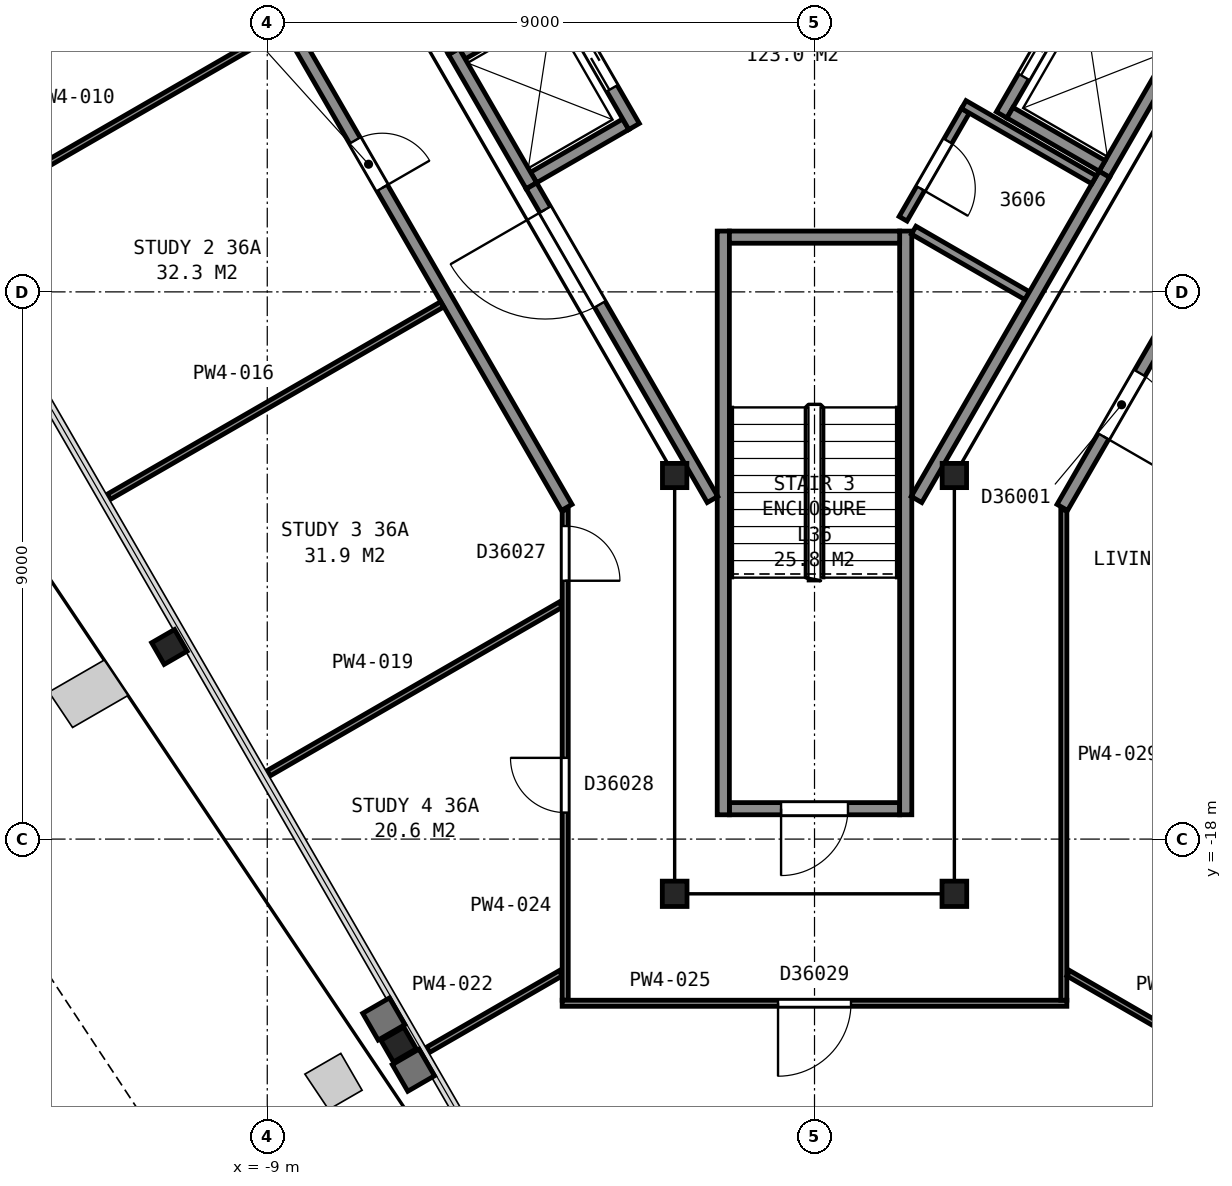
"""IFC4 building model, lengths in metres.
Left out: names, types, materials, properties, quantities, classifications, styles, units other than length and angle.
Written with IfcOpenShell. Run it as: python <this file> out.ifc"""

import sys

from ifc_helpers import new_model, si_unit, direction, frame, frame_2d, origin, origin_2d, place, context, subcontext, project, spatial, rectangle, i_section, extrude, element, fill, save


model = new_model("IFC4")
c1 = context("Model", 3, precision=1e-05, world=origin(), true_north=direction((0.0, 1.0)))
c2 = subcontext(c1, "Body", "Model", "MODEL_VIEW")
j1 = project(units=[si_unit("LENGTHUNIT", "METRE"), si_unit("PLANEANGLEUNIT", "RADIAN")], contexts=[c1])
p1 = place(None, origin())
s1 = spatial("IfcSite", under=j1, at=p1, CompositionType="ELEMENT")
p2 = place(p1, origin())
s2 = spatial("IfcBuilding", under=s1, at=p2, CompositionType="ELEMENT")
p3 = place(p2, frame((0.0, 0.0, 148.8)))
s3 = spatial("IfcBuildingStorey", under=s2, at=p3, CompositionType="ELEMENT", Elevation=148.8)
for number, where, z_axis, x_axis in (
    (1, (-10.61, -14.84, 0.0), (0.0, 0.0, 1.0), (-0.5, 0.866, 0.0)),
    (2, (-6.84, -21.38, 0.0), (0.0, 0.0, 1.0), (-0.5, 0.866, 0.0)),
):
    element("IfcColumn", number, at=place(p3, frame(where, z_axis=z_axis, x_axis=x_axis)), inside=s3, PredefinedType="COLUMN", context=c2, shape_type="SweptSolid", body=[
        extrude(i_section(OverallWidth=0.411, OverallDepth=0.434, WebThickness=0.036, FlangeThickness=0.057, FilletRadius=0.015, at=origin_2d()), origin(), (0.0, 0.0, 1.0), 3.7),
    ])
p4 = place(p3, frame((-2.3, -12.02, 0.05), z_axis=(0.0, 0.0, 1.0), x_axis=(1.0, 0.0, 0.0)))
e3 = element("IfcColumn", 3, at=p4, inside=s3, PredefinedType="COLUMN", context=c2, shape_type="SweptSolid", body=[
    extrude(i_section(OverallWidth=0.401, OverallDepth=0.399, WebThickness=0.025, FlangeThickness=0.04, FilletRadius=0.015, at=origin_2d()), origin(), (0.0, 0.0, 1.0), 3.65),
])
for number, where, z_axis, x_axis in (
    (4, (-2.3, -18.9, 0.055), (0.0, 0.0, 1.0), (-1.0, 0.0, 0.0)),
    (5, (2.3, -18.9, 0.055), (0.0, 0.0, 1.0), (-1.0, 0.0, 0.0)),
):
    element("IfcColumn", number, at=place(p3, frame(where, z_axis=z_axis, x_axis=x_axis)), inside=s3, PredefinedType="COLUMN", context=c2, shape_type="SweptSolid", body=[
        extrude(i_section(OverallWidth=0.406, OverallDepth=0.417, WebThickness=0.03, FlangeThickness=0.048, FilletRadius=0.015, at=origin_2d()), origin(), (0.0, 0.0, 1.0), 3.645),
    ])
p5 = place(p3, frame((2.3, -12.02, 0.05), z_axis=(0.0, 0.0, 1.0), x_axis=(1.0, 0.0, 0.0)))
e6 = element("IfcColumn", 6, at=p5, inside=s3, PredefinedType="COLUMN", context=c2, shape_type="SweptSolid", body=[
    extrude(i_section(OverallWidth=0.401, OverallDepth=0.399, WebThickness=0.025, FlangeThickness=0.04, FilletRadius=0.015, at=origin_2d()), origin(), (0.0, 0.0, 1.0), 3.65),
])
p6 = place(p3, frame((-1.4, -17.5, 0.0), z_axis=(0.0, 0.0, 1.0), x_axis=(1.0, 0.0, 0.0)))
e7 = element("IfcWall", 7, at=p6, inside=s3, PredefinedType="PARTITIONING", context=c2, shape_type="SweptSolid", body=[
    extrude(rectangle(XDim=2.8, YDim=0.2, at=frame_2d((1.4, 0.0))), origin(), (0.0, 0.0, 1.0), 3.45),
])
p7 = place(p6, frame((0.85, 0.0, 0.0)))
e8 = element("IfcOpeningElement", 8, at=p7, cuts=e7, PredefinedType="OPENING", context=c2, shape_type="SweptSolid", body=[
    extrude(rectangle(XDim=1.1, YDim=2.1, at=frame_2d((0.55, 1.05))), frame((0.0, 0.11, 0.0), z_axis=(0.0, -1.0, 0.0), x_axis=(1.0, 0.0, 0.0)), (0.0, 0.0, 1.0), 0.22),
])
for number, where, z_axis, x_axis in (
    (9, (1.5, -8.0, 0.0), (0.0, 0.0, 1.0), (0.0, -1.0, 0.0)),
    (10, (-1.5, -8.0, 0.0), (0.0, 0.0, 1.0), (0.0, -1.0, 0.0)),
):
    element("IfcWall", number, at=place(p3, frame(where, z_axis=z_axis, x_axis=x_axis)), inside=s3, PredefinedType="PARTITIONING", context=c2, shape_type="SweptSolid", body=[
        extrude(rectangle(XDim=9.6, YDim=0.2, at=frame_2d((4.8, 0.0))), origin(), (0.0, 0.0, 1.0), 3.45),
    ])
p8 = place(p3, frame((-1.4, -8.1, 0.0), z_axis=(0.0, 0.0, 1.0), x_axis=(1.0, 0.0, 0.0)))
e11 = element("IfcWall", 11, at=p8, inside=s3, PredefinedType="PARTITIONING", context=c2, shape_type="SweptSolid", body=[
    extrude(rectangle(XDim=2.8, YDim=0.2, at=frame_2d((1.4, 0.0))), origin(), (0.0, 0.0, 1.0), 3.45),
])
for number, where, z_axis, x_axis in (
    (12, (-4.62, -7.118, 0.0), (0.0, 0.0, 1.0), (0.866, 0.5, 0.0)),
    (13, (-5.795, -5.083, 0.0), (0.0, 0.0, 1.0), (0.866, 0.5, 0.0)),
):
    element("IfcWall", number, at=place(p3, frame(where, z_axis=z_axis, x_axis=x_axis)), inside=s3, PredefinedType="PARTITIONING", context=c2, shape_type="SweptSolid", body=[
        extrude(rectangle(XDim=1.75, YDim=0.2, at=frame_2d((0.875, 0.0))), origin(), (0.0, 0.0, 1.0), 3.7),
    ])
p9 = place(p3, frame((4.766, -7.065, 0.0), z_axis=(0.0, 0.0, 1.0), x_axis=(0.499948979701, 0.866054858364, 0.0)))
e14 = element("IfcWall", 14, at=p9, inside=s3, PredefinedType="PARTITIONING", context=c2, shape_type="SweptSolid", body=[
    extrude(rectangle(XDim=2.55, YDim=0.2, at=frame_2d((1.275, 0.0))), origin(), (0.0, 0.0, 1.0), 3.7),
])
p10 = place(p3, frame((3.077, -6.09, 0.0), z_axis=(0.0, 0.0, 1.0), x_axis=(0.500062241894, 0.865989465428, 0.0)))
e15 = element("IfcWall", 15, at=p10, inside=s3, PredefinedType="PARTITIONING", context=c2, shape_type="SweptSolid", body=[
    extrude(rectangle(XDim=2.55, YDim=0.2, at=frame_2d((1.275, 0.0))), origin(), (0.0, 0.0, 1.0), 3.7),
])
p11 = place(p10, frame((0.725, 0.0, 0.0)))
e16 = element("IfcOpeningElement", 16, at=p11, cuts=e15, PredefinedType="OPENING", context=c2, shape_type="SweptSolid", body=[
    extrude(rectangle(XDim=1.1, YDim=2.1, at=frame_2d((0.55, 1.05))), frame((0.0, 0.11, 0.0), z_axis=(0.0, -1.0, 0.0), x_axis=(1.0, 0.0, 0.0)), (0.0, 0.0, 1.0), 0.22),
])
p12 = place(p3, frame((-2.968, -6.28, 0.0), z_axis=(0.0, 0.0, 1.0), x_axis=(-0.499990435942, 0.866030925526, 0.0)))
e17 = element("IfcWall", 17, at=p12, inside=s3, PredefinedType="PARTITIONING", context=c2, shape_type="SweptSolid", body=[
    extrude(rectangle(XDim=2.55, YDim=0.2, at=frame_2d((1.275, 0.0))), origin(), (0.0, 0.0, 1.0), 3.7),
])
p13 = place(p12, frame((0.725, 0.0, 0.0)))
e18 = element("IfcOpeningElement", 18, at=p13, cuts=e17, PredefinedType="OPENING", context=c2, shape_type="SweptSolid", body=[
    extrude(rectangle(XDim=1.1, YDim=2.1, at=frame_2d((0.55, 1.05))), frame((0.0, 0.11, 0.0), z_axis=(0.0, -1.0, 0.0), x_axis=(1.0, 0.0, 0.0)), (0.0, 0.0, 1.0), 0.22),
])
p14 = place(p3, frame((-4.656, -7.255, 0.0), z_axis=(0.0, 0.0, 1.0), x_axis=(-0.499990435942, 0.866030925526, 0.0)))
e19 = element("IfcWall", 19, at=p14, inside=s3, PredefinedType="PARTITIONING", context=c2, shape_type="SweptSolid", body=[
    extrude(rectangle(XDim=2.55, YDim=0.2, at=frame_2d((1.275, 0.0))), origin(), (0.0, 0.0, 1.0), 3.7),
])
p15 = place(p3, frame((4.73, -6.928, 0.0), z_axis=(0.0, 0.0, 1.0), x_axis=(-0.866036909293, 0.499980071345, 0.0)))
e20 = element("IfcWall", 20, at=p15, inside=s3, PredefinedType="PARTITIONING", context=c2, shape_type="SweptSolid", body=[
    extrude(rectangle(XDim=1.75, YDim=0.2, at=frame_2d((0.875, 0.0))), origin(), (0.0, 0.0, 1.0), 3.7),
])
p16 = place(p3, frame((-7.005, -3.187, 0.0), z_axis=(0.0, 0.0, 1.0), x_axis=(0.499689606989, -0.866204535123, 0.0)))
e21 = element("IfcWall", 21, at=p16, inside=s3, PredefinedType="PARTITIONING", context=c2, shape_type="SweptSolid", body=[
    extrude(rectangle(XDim=2.145, YDim=0.2, at=frame_2d((1.072, 0.0))), origin(), (0.0, 0.0, 1.0), 3.45),
])
p17 = place(p3, frame((-4.655, -7.257, 0.0), z_axis=(0.0, 0.0, 1.0), x_axis=(0.499966124405, -0.866044960985, 0.0)))
e22 = element("IfcWall", 22, at=p17, inside=s3, PredefinedType="PARTITIONING", context=c2, shape_type="SweptSolid", body=[
    extrude(rectangle(XDim=5.956, YDim=0.2, at=frame_2d((2.978, 0.0))), origin(), (0.0, 0.0, 1.0), 3.45),
])
p18 = place(p17, frame((0.45, 0.0, 0.0)))
e23 = element("IfcOpeningElement", 23, at=p18, cuts=e22, PredefinedType="OPENING", context=c2, shape_type="SweptSolid", body=[
    extrude(rectangle(XDim=1.8, YDim=2.1, at=frame_2d((0.9, 1.05))), frame((0.0, 0.11, 0.0), z_axis=(0.0, -1.0, 0.0), x_axis=(1.0, 0.0, 0.0)), (0.0, 0.0, 1.0), 0.22),
])
p19 = place(p3, frame((2.481, -6.022, 0.0), z_axis=(0.0, 0.0, 1.0), x_axis=(-0.499801470403, -0.866139994564, 0.0)))
e24 = element("IfcWall", 24, at=p19, inside=s3, PredefinedType="PARTITIONING", context=c2, shape_type="SweptSolid", body=[
    extrude(rectangle(XDim=2.051, YDim=0.15, at=frame_2d((1.025, 0.0))), origin(), (0.0, 0.0, 1.0), 3.45),
])
p20 = place(p19, frame((0.576, 0.0, 0.0)))
e25 = element("IfcOpeningElement", 25, at=p20, cuts=e24, PredefinedType="OPENING", context=c2, shape_type="SweptSolid", body=[
    extrude(rectangle(XDim=0.9, YDim=2.1, at=frame_2d((0.45, 1.05))), frame((0.0, 0.085, 0.0), z_axis=(0.0, -1.0, 0.0), x_axis=(1.0, 0.0, 0.0)), (0.0, 0.0, 1.0), 0.17),
])
p21 = place(p3, frame((1.631, -7.986, 0.0), z_axis=(0.0, 0.0, 1.0), x_axis=(0.866038426532, -0.499977443261, 0.0)))
e26 = element("IfcWall", 26, at=p21, inside=s3, PredefinedType="PARTITIONING", context=c2, shape_type="SweptSolid", body=[
    extrude(rectangle(XDim=2.155, YDim=0.15, at=frame_2d((1.077, 0.0))), origin(), (0.0, 0.0, 1.0), 3.45),
])
p22 = place(p3, frame((1.677, -12.415, 0.0), z_axis=(0.0, 0.0, 1.0), x_axis=(0.500054337157, 0.865994029939, 0.0)))
e27 = element("IfcWall", 27, at=p22, inside=s3, PredefinedType="PARTITIONING", context=c2, shape_type="SweptSolid", body=[
    extrude(rectangle(XDim=6.177, YDim=0.2, at=frame_2d((3.088, 0.0))), origin(), (0.0, 0.0, 1.0), 3.45),
])
p23 = place(p3, frame((2.454, -5.919, 0.0), z_axis=(0.0, 0.0, 1.0), x_axis=(0.866006523861, -0.500032699561, 0.0)))
e28 = element("IfcWall", 28, at=p23, inside=s3, PredefinedType="PARTITIONING", context=c2, shape_type="SweptSolid", body=[
    extrude(rectangle(XDim=2.475, YDim=0.15, at=frame_2d((1.237, 0.0))), origin(), (0.0, 0.0, 1.0), 3.45),
])
p24 = place(p3, frame((-14.23, -7.823, 0.0), z_axis=(0.0, 0.0, 1.0), x_axis=(0.866021249958, 0.50000719457, 0.0)))
e29 = element("IfcWall", 29, at=p24, inside=s3, PredefinedType="PARTITIONING", context=c2, shape_type="SweptSolid", body=[
    extrude(rectangle(XDim=6.333, YDim=0.1, at=frame_2d((3.167, 0.0))), origin(), (0.0, 0.0, 1.0), 2.713),
])
p25 = place(p3, frame((-4.075, -12.545, 0.0), z_axis=(0.0, 0.0, 1.0), x_axis=(-0.499999743747, 0.866025551732, 0.0)))
e30 = element("IfcWall", 30, at=p25, inside=s3, PredefinedType="PARTITIONING", context=c2, shape_type="SweptSolid", body=[
    extrude(rectangle(XDim=17.656, YDim=0.2, at=frame_2d((8.828, 0.0))), origin(), (0.0, 0.0, 1.0), 2.713),
])
p26 = place(p25, frame((10.08, 0.0, 0.0)))
e31 = element("IfcOpeningElement", 31, at=p26, cuts=e30, PredefinedType="OPENING", context=c2, shape_type="SweptSolid", body=[
    extrude(rectangle(XDim=0.9, YDim=2.1, at=frame_2d((0.45, 1.05))), frame((0.0, 0.11, 0.0), z_axis=(0.0, -1.0, 0.0), x_axis=(1.0, 0.0, 0.0)), (0.0, 0.0, 1.0), 0.22),
])
p27 = place(p25, frame((6.068, 0.0, 0.0)))
e32 = element("IfcOpeningElement", 32, at=p27, cuts=e30, PredefinedType="OPENING", context=c2, shape_type="SweptSolid", body=[
    extrude(rectangle(XDim=0.9, YDim=2.1, at=frame_2d((0.45, 1.05))), frame((0.0, 0.11, 0.0), z_axis=(0.0, -1.0, 0.0), x_axis=(1.0, 0.0, 0.0)), (0.0, 0.0, 1.0), 0.22),
])
p28 = place(p3, frame((-11.605, -12.37, 0.0), z_axis=(0.0, 0.0, 1.0), x_axis=(0.866017278078, 0.500014073873, 0.0)))
e33 = element("IfcWall", 33, at=p28, inside=s3, PredefinedType="PARTITIONING", context=c2, shape_type="SweptSolid", body=[
    extrude(rectangle(XDim=6.329, YDim=0.1, at=frame_2d((3.165, 0.0))), origin(), (0.0, 0.0, 1.0), 2.713),
])
p29 = place(p3, frame((-8.979, -16.918, 0.0), z_axis=(0.0, 0.0, 1.0), x_axis=(0.866046339293, 0.499963736882, 0.0)))
e34 = element("IfcWall", 34, at=p29, inside=s3, PredefinedType="PARTITIONING", context=c2, shape_type="SweptSolid", body=[
    extrude(rectangle(XDim=5.547, YDim=0.1, at=frame_2d((2.774, 0.0))), origin(), (0.0, 0.0, 1.0), 2.713),
])
p30 = place(p3, frame((-6.354, -21.465, 0.0), z_axis=(0.0, 0.0, 1.0), x_axis=(0.866061165757, 0.499938053331, 0.0)))
e35 = element("IfcWall", 35, at=p30, inside=s3, PredefinedType="PARTITIONING", context=c2, shape_type="SweptSolid", body=[
    extrude(rectangle(XDim=2.516, YDim=0.1, at=frame_2d((1.258, 0.0))), origin(), (0.0, 0.0, 1.0), 2.713),
])
p31 = place(p3, frame((-4.1, -20.65, 0.0), z_axis=(0.0, 0.0, 1.0), x_axis=(0.0, 1.0, 0.0)))
e36 = element("IfcWall", 36, at=p31, inside=s3, PredefinedType="PARTITIONING", context=c2, shape_type="SweptSolid", body=[
    extrude(rectangle(XDim=8.063, YDim=0.1, at=frame_2d((4.031, 0.0))), origin(), (0.0, 0.0, 1.0), 2.713),
])
p32 = place(p31, frame((6.899, 0.0, 0.0)))
e37 = element("IfcOpeningElement", 37, at=p32, cuts=e36, PredefinedType="OPENING", context=c2, shape_type="SweptSolid", body=[
    extrude(rectangle(XDim=0.9, YDim=2.1, at=frame_2d((0.45, 1.05))), frame((0.0, 0.06, 0.0), z_axis=(0.0, -1.0, 0.0), x_axis=(1.0, 0.0, 0.0)), (0.0, 0.0, 1.0), 0.12),
])
p33 = place(p31, frame((3.086, 0.0, 0.0)))
e38 = element("IfcOpeningElement", 38, at=p33, cuts=e36, PredefinedType="OPENING", context=c2, shape_type="SweptSolid", body=[
    extrude(rectangle(XDim=0.9, YDim=2.1, at=frame_2d((0.45, 1.05))), frame((0.0, 0.06, 0.0), z_axis=(0.0, -1.0, 0.0), x_axis=(1.0, 0.0, 0.0)), (0.0, 0.0, 1.0), 0.12),
])
p34 = place(p3, frame((4.15, -20.7, 0.0), z_axis=(0.0, 0.0, 1.0), x_axis=(-1.0, 0.0, 0.0)))
e39 = element("IfcWall", 39, at=p34, inside=s3, PredefinedType="PARTITIONING", context=c2, shape_type="SweptSolid", body=[
    extrude(rectangle(XDim=8.3, YDim=0.1, at=frame_2d((4.15, 0.0))), origin(), (0.0, 0.0, 1.0), 2.713),
])
p35 = place(p34, frame((3.55, 0.0, 0.0)))
e40 = element("IfcOpeningElement", 40, at=p35, cuts=e39, PredefinedType="OPENING", context=c2, shape_type="SweptSolid", body=[
    extrude(rectangle(XDim=1.2, YDim=2.1, at=frame_2d((0.6, 1.05))), frame((0.0, 0.06, 0.0), z_axis=(0.0, -1.0, 0.0), x_axis=(1.0, 0.0, 0.0)), (0.0, 0.0, 1.0), 0.12),
])
p36 = place(p3, frame((4.1, -20.65, 0.0), z_axis=(0.0, 0.0, 1.0), x_axis=(0.0, 1.0, 0.0)))
e41 = element("IfcWall", 41, at=p36, inside=s3, PredefinedType="PARTITIONING", context=c2, shape_type="SweptSolid", body=[
    extrude(rectangle(XDim=8.063, YDim=0.1, at=frame_2d((4.031, 0.0))), origin(), (0.0, 0.0, 1.0), 2.713),
])
p37 = place(p3, frame((4.175, -20.207, 0.0), z_axis=(0.0, 0.0, 1.0), x_axis=(0.866061165757, -0.499938053331, 0.0)))
e42 = element("IfcWall", 42, at=p37, inside=s3, PredefinedType="PARTITIONING", context=c2, shape_type="SweptSolid", body=[
    extrude(rectangle(XDim=2.516, YDim=0.1, at=frame_2d((1.258, 0.0))), origin(), (0.0, 0.0, 1.0), 2.713),
])
p38 = place(p3, frame((12.928, 2.789, 0.0), z_axis=(0.0, 0.0, 1.0), x_axis=(-0.499997769292, -0.86602669168, 0.0)))
e43 = element("IfcWall", 43, at=p38, inside=s3, PredefinedType="PARTITIONING", context=c2, shape_type="SweptSolid", body=[
    extrude(rectangle(XDim=17.706, YDim=0.2, at=frame_2d((8.853, 0.0))), origin(), (0.0, 0.0, 1.0), 2.713),
])
p39 = place(p38, frame((15.156, 0.0, 0.0)))
e44 = element("IfcOpeningElement", 44, at=p39, cuts=e43, PredefinedType="OPENING", context=c2, shape_type="SweptSolid", body=[
    extrude(rectangle(XDim=1.2, YDim=2.1, at=frame_2d((0.6, 1.05))), frame((0.0, 0.11, 0.0), z_axis=(0.0, -1.0, 0.0), x_axis=(1.0, 0.0, 0.0)), (0.0, 0.0, 1.0), 0.22),
])
p40 = place(p38, frame((11.042, 0.0, 0.0)))
e45 = element("IfcOpeningElement", 45, at=p40, cuts=e43, PredefinedType="OPENING", context=c2, shape_type="SweptSolid", body=[
    extrude(rectangle(XDim=0.9, YDim=2.1, at=frame_2d((0.45, 1.05))), frame((0.0, 0.11, 0.0), z_axis=(0.0, -1.0, 0.0), x_axis=(1.0, 0.0, 0.0)), (0.0, 0.0, 1.0), 0.22),
])
p41 = place(p38, frame((7.14, 0.0, 0.0)))
e46 = element("IfcOpeningElement", 46, at=p41, cuts=e43, PredefinedType="OPENING", context=c2, shape_type="SweptSolid", body=[
    extrude(rectangle(XDim=0.9, YDim=2.1, at=frame_2d((0.45, 1.05))), frame((0.0, 0.11, 0.0), z_axis=(0.0, -1.0, 0.0), x_axis=(1.0, 0.0, 0.0)), (0.0, 0.0, 1.0), 0.22),
])
p42 = place(p38, frame((0.515, 0.0, 0.0)))
e47 = element("IfcOpeningElement", 47, at=p42, cuts=e43, PredefinedType="OPENING", context=c2, shape_type="SweptSolid", body=[
    extrude(rectangle(XDim=0.9, YDim=2.1, at=frame_2d((0.45, 1.05))), frame((0.0, 0.11, 0.0), z_axis=(0.0, -1.0, 0.0), x_axis=(1.0, 0.0, 0.0)), (0.0, 0.0, 1.0), 0.22),
])
p43 = place(p7, origin())
e48 = element("IfcDoor", 48, at=p43, inside=s3, OperationType="SINGLE_SWING_LEFT", PredefinedType="DOOR", context=c2, shape_type="SweptSolid", body=[
    extrude(rectangle(XDim=1.1, YDim=2.1, at=frame_2d((0.55, 1.05))), frame((0.0, 0.025, 0.0), z_axis=(0.0, -1.0, 0.0), x_axis=(1.0, 0.0, 0.0)), (0.0, 0.0, 1.0), 0.05),
])
fill(e8, e48)
p44 = place(p11, origin())
e49 = element("IfcDoor", 49, at=p44, inside=s3, OperationType="SLIDING_TO_LEFT", PredefinedType="DOOR", context=c2, shape_type="SweptSolid", body=[
    extrude(rectangle(XDim=1.1, YDim=2.1, at=frame_2d((0.55, 1.05))), frame((0.0, 0.025, 0.0), z_axis=(0.0, -1.0, 0.0), x_axis=(1.0, 0.0, 0.0)), (0.0, 0.0, 1.0), 0.05),
])
fill(e16, e49)
p45 = place(p13, origin())
e50 = element("IfcDoor", 50, at=p45, inside=s3, OperationType="SLIDING_TO_RIGHT", PredefinedType="DOOR", context=c2, shape_type="SweptSolid", body=[
    extrude(rectangle(XDim=1.1, YDim=2.1, at=frame_2d((0.55, 1.05))), frame((0.0, 0.025, 0.0), z_axis=(0.0, -1.0, 0.0), x_axis=(1.0, 0.0, 0.0)), (0.0, 0.0, 1.0), 0.05),
])
fill(e18, e50)
p46 = place(p18, origin())
e51 = element("IfcDoor", 51, at=p46, inside=s3, OperationType="DOUBLE_DOOR_SINGLE_SWING", PredefinedType="DOOR", context=c2, shape_type="SweptSolid", body=[
    extrude(rectangle(XDim=1.8, YDim=2.1, at=frame_2d((0.9, 1.05))), frame((0.0, 0.025, 0.0), z_axis=(0.0, -1.0, 0.0), x_axis=(1.0, 0.0, 0.0)), (0.0, 0.0, 1.0), 0.05),
])
fill(e23, e51)
p47 = place(p20, origin())
e52 = element("IfcDoor", 52, at=p47, inside=s3, OperationType="SINGLE_SWING_RIGHT", PredefinedType="DOOR", context=c2, shape_type="SweptSolid", body=[
    extrude(rectangle(XDim=0.9, YDim=2.1, at=frame_2d((0.45, 1.05))), frame((0.0, 0.025, 0.0), z_axis=(0.0, -1.0, 0.0), x_axis=(1.0, 0.0, 0.0)), (0.0, 0.0, 1.0), 0.05),
])
fill(e25, e52)
p48 = place(p27, origin())
e53 = element("IfcDoor", 53, at=p48, inside=s3, OperationType="SINGLE_SWING_LEFT", PredefinedType="DOOR", context=c2, shape_type="SweptSolid", body=[
    extrude(rectangle(XDim=0.9, YDim=2.1, at=frame_2d((0.45, 1.05))), frame((0.0, 0.025, 0.0), z_axis=(0.0, -1.0, 0.0), x_axis=(1.0, 0.0, 0.0)), (0.0, 0.0, 1.0), 0.05),
])
fill(e32, e53)
p49 = place(p32, origin())
e54 = element("IfcDoor", 54, at=p49, inside=s3, OperationType="SINGLE_SWING_LEFT", PredefinedType="DOOR", context=c2, shape_type="SweptSolid", body=[
    extrude(rectangle(XDim=0.9, YDim=2.1, at=frame_2d((0.45, 1.05))), frame((0.0, 0.025, 0.0), z_axis=(0.0, -1.0, 0.0), x_axis=(1.0, 0.0, 0.0)), (0.0, 0.0, 1.0), 0.05),
])
fill(e37, e54)
p50 = place(p33, origin())
e55 = element("IfcDoor", 55, at=p50, inside=s3, OperationType="SINGLE_SWING_RIGHT", PredefinedType="DOOR", context=c2, shape_type="SweptSolid", body=[
    extrude(rectangle(XDim=0.9, YDim=2.1, at=frame_2d((0.45, 1.05))), frame((0.0, 0.025, 0.0), z_axis=(0.0, -1.0, 0.0), x_axis=(1.0, 0.0, 0.0)), (0.0, 0.0, 1.0), 0.05),
])
fill(e38, e55)
p51 = place(p35, origin())
e56 = element("IfcDoor", 56, at=p51, inside=s3, OperationType="SINGLE_SWING_RIGHT", PredefinedType="DOOR", context=c2, shape_type="SweptSolid", body=[
    extrude(rectangle(XDim=1.2, YDim=2.1, at=frame_2d((0.6, 1.05))), frame((0.0, 0.025, 0.0), z_axis=(0.0, -1.0, 0.0), x_axis=(1.0, 0.0, 0.0)), (0.0, 0.0, 1.0), 0.05),
])
fill(e40, e56)
p52 = place(p39, origin())
e57 = element("IfcDoor", 57, at=p52, inside=s3, OperationType="SINGLE_SWING_RIGHT", PredefinedType="DOOR", context=c2, shape_type="SweptSolid", body=[
    extrude(rectangle(XDim=1.2, YDim=2.1, at=frame_2d((0.6, 1.05))), frame((0.0, 0.025, 0.0), z_axis=(0.0, -1.0, 0.0), x_axis=(1.0, 0.0, 0.0)), (0.0, 0.0, 1.0), 0.05),
])
fill(e44, e57)
save(model, sys.argv[1])
